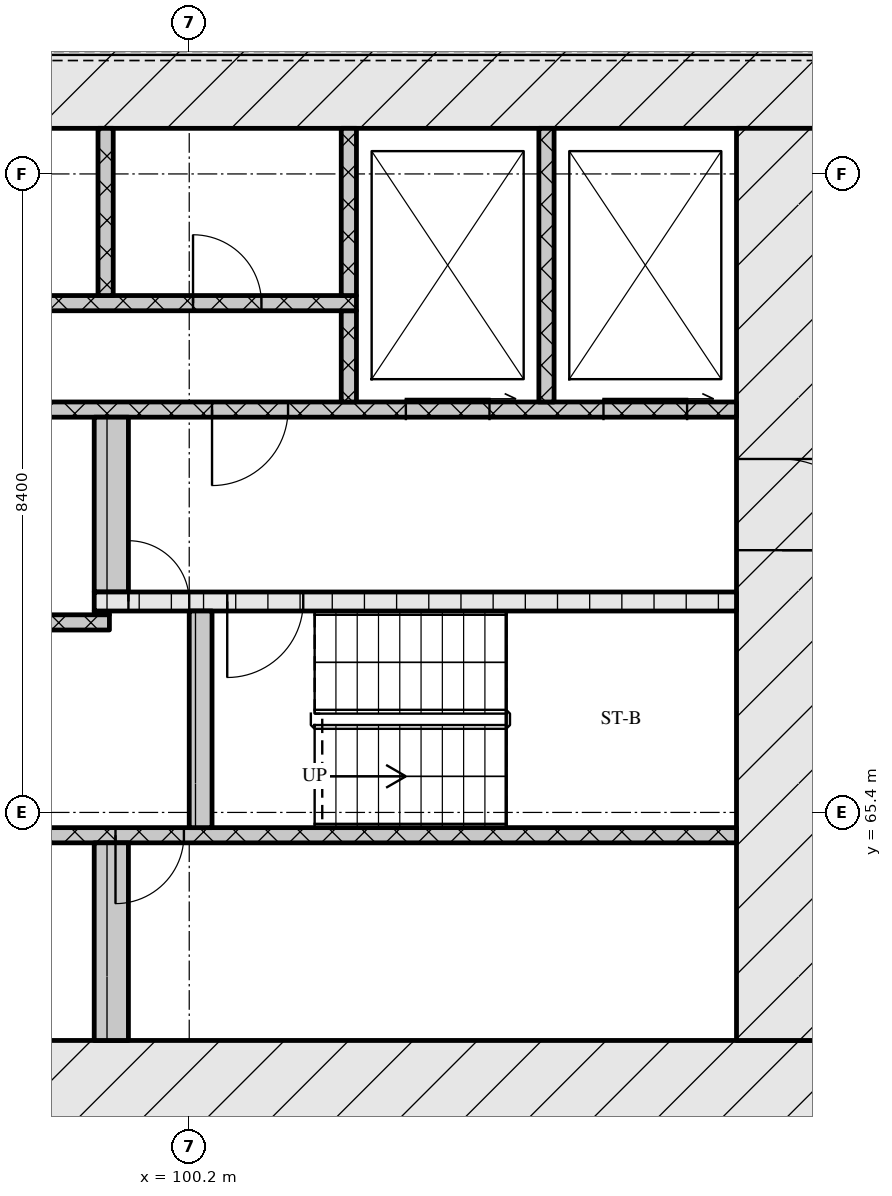
"""IFC4 building model, lengths in metres.
Left out: names, types, materials, properties, quantities, classifications, styles, units other than length and angle.
Written with IfcOpenShell. Run it as: python <this file> out.ifc"""

import sys

from ifc_helpers import new_model, si_unit, direction, frame, frame_2d, origin, place, context, subcontext, project, spatial, rectangle, extrude, element, fill, save


model = new_model("IFC4")
c1 = context("Model", 3, precision=1e-05, world=origin(), true_north=direction((0.0, 1.0)))
c2 = subcontext(c1, "Body", "Model", "MODEL_VIEW")
j1 = project(units=[si_unit("LENGTHUNIT", "METRE"), si_unit("PLANEANGLEUNIT", "RADIAN")], contexts=[c1])
p1 = place(None, origin())
s1 = spatial("IfcSite", under=j1, at=p1, CompositionType="ELEMENT")
p2 = place(p1, origin())
s2 = spatial("IfcBuilding", under=s1, at=p2, CompositionType="ELEMENT")
p3 = place(p2, frame((0.0, 0.0, 40.8)))
s3 = spatial("IfcBuildingStorey", under=s2, at=p3, CompositionType="ELEMENT", Elevation=40.8)
p4 = place(p3, frame((66.6, 61.8, 0.0), z_axis=(0.0, 0.0, 1.0), x_axis=(1.0, 0.0, 0.0)))
e1 = element("IfcWall", 1, at=p4, inside=s3, PredefinedType="SOLIDWALL", context=c2, shape_type="SweptSolid", body=[
    extrude(rectangle(XDim=42.0, YDim=1.2, at=frame_2d((21.0, 0.0))), origin(), (0.0, 0.0, 1.0), 3.32),
])
p5 = place(p4, frame((21.35, 0.0, 0.0)))
e2 = element("IfcOpeningElement", 2, at=p5, cuts=e1, PredefinedType="OPENING", context=c2, shape_type="SweptSolid", body=[
    extrude(rectangle(XDim=1.8, YDim=2.1, at=frame_2d((0.9, 1.05))), frame((0.0, 0.61, 0.0), z_axis=(0.0, -1.0, 0.0), x_axis=(1.0, 0.0, 0.0)), (0.0, 0.0, 1.0), 1.22),
])
p6 = place(p3, frame((66.6, 75.0, 0.0), z_axis=(0.0, 0.0, 1.0), x_axis=(1.0, 0.0, 0.0)))
e3 = element("IfcWall", 3, at=p6, inside=s3, PredefinedType="SOLIDWALL", context=c2, shape_type="SweptSolid", body=[
    extrude(rectangle(XDim=42.0, YDim=1.2, at=frame_2d((21.0, 0.0))), origin(), (0.0, 0.0, 1.0), 3.32),
])
p7 = place(p3, frame((108.0, 62.4, 0.0), z_axis=(0.0, 0.0, 1.0), x_axis=(0.0, 1.0, 0.0)))
e4 = element("IfcWall", 4, at=p7, inside=s3, PredefinedType="SOLIDWALL", context=c2, shape_type="SweptSolid", body=[
    extrude(rectangle(XDim=12.0, YDim=1.2, at=frame_2d((6.0, 0.0))), origin(), (0.0, 0.0, 1.0), 3.32),
])
p8 = place(p7, frame((6.45, 0.0, 0.0)))
e5 = element("IfcOpeningElement", 5, at=p8, cuts=e4, PredefinedType="OPENING", context=c2, shape_type="SweptSolid", body=[
    extrude(rectangle(XDim=1.2, YDim=2.1, at=frame_2d((0.6, 1.05))), frame((0.0, 0.61, 0.0), z_axis=(0.0, -1.0, 0.0), x_axis=(1.0, 0.0, 0.0)), (0.0, 0.0, 1.0), 1.22),
])
p9 = place(p3, frame((99.175, 62.4, 0.0), z_axis=(0.0, 0.0, 1.0), x_axis=(0.0, 1.0, 0.0)))
e6 = element("IfcWall", 6, at=p9, inside=s3, PredefinedType="SOLIDWALL", context=c2, shape_type="SweptSolid", body=[
    extrude(rectangle(XDim=2.6, YDim=0.45, at=frame_2d((1.3, 0.0))), origin(), (0.0, 0.0, 1.0), 3.32),
])
p10 = place(p3, frame((91.4, 65.1, 0.0), z_axis=(0.0, 0.0, 1.0), x_axis=(1.0, 0.0, 0.0)))
e7 = element("IfcWall", 7, at=p10, inside=s3, PredefinedType="SOLIDWALL", context=c2, shape_type="SweptSolid", body=[
    extrude(rectangle(XDim=16.0, YDim=0.2, at=frame_2d((8.0, 0.0))), origin(), (0.0, 0.0, 1.0), 3.32),
])
p11 = place(p10, frame((7.83, 0.0, 0.0)))
e8 = element("IfcOpeningElement", 8, at=p11, cuts=e7, PredefinedType="OPENING", context=c2, shape_type="SweptSolid", body=[
    extrude(rectangle(XDim=0.9, YDim=2.1, at=frame_2d((0.45, 1.05))), frame((0.0, 0.11, 0.0), z_axis=(0.0, -1.0, 0.0), x_axis=(1.0, 0.0, 0.0)), (0.0, 0.0, 1.0), 0.22),
])
p12 = place(p3, frame((100.35, 65.2, 0.0), z_axis=(0.0, 0.0, 1.0), x_axis=(0.0, 1.0, 0.0)))
e9 = element("IfcWall", 9, at=p12, inside=s3, PredefinedType="SOLIDWALL", context=c2, shape_type="SweptSolid", body=[
    extrude(rectangle(XDim=2.85, YDim=0.3, at=frame_2d((1.425, 0.0))), origin(), (0.0, 0.0, 1.0), 3.32),
])
p13 = place(p3, frame((76.05, 67.9, 0.0), z_axis=(0.0, 0.0, 1.0), x_axis=(1.0, 0.0, 0.0)))
e10 = element("IfcWall", 10, at=p13, inside=s3, PredefinedType="SOLIDWALL", context=c2, shape_type="SweptSolid", body=[
    extrude(rectangle(XDim=23.1, YDim=0.2, at=frame_2d((11.55, 0.0))), origin(), (0.0, 0.0, 1.0), 3.32),
])
p14 = place(p13, frame((0.6, 0.0, 0.0)))
e11 = element("IfcOpeningElement", 11, at=p14, cuts=e10, PredefinedType="OPENING", context=c2, shape_type="SweptSolid", body=[
    extrude(rectangle(XDim=1.1, YDim=2.1, at=frame_2d((0.55, 1.05))), frame((0.0, 0.11, 0.0), z_axis=(0.0, -1.0, 0.0), x_axis=(1.0, 0.0, 0.0)), (0.0, 0.0, 1.0), 0.22),
])
p15 = place(p13, frame((3.1, 0.0, 0.0)))
e12 = element("IfcOpeningElement", 12, at=p15, cuts=e10, PredefinedType="OPENING", context=c2, shape_type="SweptSolid", body=[
    extrude(rectangle(XDim=1.1, YDim=2.1, at=frame_2d((0.55, 1.05))), frame((0.0, 0.11, 0.0), z_axis=(0.0, -1.0, 0.0), x_axis=(1.0, 0.0, 0.0)), (0.0, 0.0, 1.0), 0.22),
])
p16 = place(p13, frame((5.6, 0.0, 0.0)))
e13 = element("IfcOpeningElement", 13, at=p16, cuts=e10, PredefinedType="OPENING", context=c2, shape_type="SweptSolid", body=[
    extrude(rectangle(XDim=1.1, YDim=2.1, at=frame_2d((0.55, 1.05))), frame((0.0, 0.11, 0.0), z_axis=(0.0, -1.0, 0.0), x_axis=(1.0, 0.0, 0.0)), (0.0, 0.0, 1.0), 0.22),
])
p17 = place(p13, frame((8.45, 0.0, 0.0)))
e14 = element("IfcOpeningElement", 14, at=p17, cuts=e10, PredefinedType="OPENING", context=c2, shape_type="SweptSolid", body=[
    extrude(rectangle(XDim=0.9, YDim=2.1, at=frame_2d((0.45, 1.05))), frame((0.0, 0.11, 0.0), z_axis=(0.0, -1.0, 0.0), x_axis=(1.0, 0.0, 0.0)), (0.0, 0.0, 1.0), 0.22),
])
p18 = place(p13, frame((10.91, 0.0, 0.0)))
e15 = element("IfcOpeningElement", 15, at=p18, cuts=e10, PredefinedType="OPENING", context=c2, shape_type="SweptSolid", body=[
    extrude(rectangle(XDim=0.9, YDim=2.1, at=frame_2d((0.45, 1.05))), frame((0.0, 0.11, 0.0), z_axis=(0.0, -1.0, 0.0), x_axis=(1.0, 0.0, 0.0)), (0.0, 0.0, 1.0), 0.22),
])
p19 = place(p13, frame((13.55, 0.0, 0.0)))
e16 = element("IfcOpeningElement", 16, at=p19, cuts=e10, PredefinedType="OPENING", context=c2, shape_type="SweptSolid", body=[
    extrude(rectangle(XDim=1.0, YDim=2.1, at=frame_2d((0.5, 1.05))), frame((0.0, 0.11, 0.0), z_axis=(0.0, -1.0, 0.0), x_axis=(1.0, 0.0, 0.0)), (0.0, 0.0, 1.0), 0.22),
])
p20 = place(p3, frame((98.95, 68.025, 0.0), z_axis=(0.0, 0.0, 1.0), x_axis=(1.0, 0.0, 0.0)))
e17 = element("IfcWall", 17, at=p20, inside=s3, PredefinedType="SOLIDWALL", context=c2, shape_type="SweptSolid", body=[
    extrude(rectangle(XDim=0.2, YDim=0.05, at=frame_2d((0.1, 0.0))), origin(), (0.0, 0.0, 1.0), 3.32),
])
p21 = place(p3, frame((98.95, 68.175, 0.0), z_axis=(0.0, 0.0, 1.0), x_axis=(1.0, 0.0, 0.0)))
e18 = element("IfcWall", 18, at=p21, inside=s3, PredefinedType="SOLIDWALL", context=c2, shape_type="SweptSolid", body=[
    extrude(rectangle(XDim=8.45, YDim=0.25, at=frame_2d((4.225, 0.0))), origin(), (0.0, 0.0, 1.0), 3.32),
])
p22 = place(p21, frame((0.45, 0.0, 0.0)))
e19 = element("IfcOpeningElement", 19, at=p22, cuts=e18, PredefinedType="OPENING", context=c2, shape_type="SweptSolid", body=[
    extrude(rectangle(XDim=0.8, YDim=2.1, at=frame_2d((0.4, 1.05))), frame((0.0, 0.135, 0.0), z_axis=(0.0, -1.0, 0.0), x_axis=(1.0, 0.0, 0.0)), (0.0, 0.0, 1.0), 0.27),
])
p23 = place(p21, frame((1.75, 0.0, 0.0)))
e20 = element("IfcOpeningElement", 20, at=p23, cuts=e18, PredefinedType="OPENING", context=c2, shape_type="SweptSolid", body=[
    extrude(rectangle(XDim=1.0, YDim=2.1, at=frame_2d((0.5, 1.05))), frame((0.0, 0.135, 0.0), z_axis=(0.0, -1.0, 0.0), x_axis=(1.0, 0.0, 0.0)), (0.0, 0.0, 1.0), 0.27),
])
p24 = place(p3, frame((99.175, 68.3, 0.0), z_axis=(0.0, 0.0, 1.0), x_axis=(0.0, 1.0, 0.0)))
e21 = element("IfcWall", 21, at=p24, inside=s3, PredefinedType="SOLIDWALL", context=c2, shape_type="SweptSolid", body=[
    extrude(rectangle(XDim=2.3, YDim=0.45, at=frame_2d((1.15, 0.0))), origin(), (0.0, 0.0, 1.0), 3.32),
])
p25 = place(p3, frame((67.8, 70.7, 0.0), z_axis=(0.0, 0.0, 1.0), x_axis=(1.0, 0.0, 0.0)))
e22 = element("IfcWall", 22, at=p25, inside=s3, PredefinedType="SOLIDWALL", context=c2, shape_type="SweptSolid", body=[
    extrude(rectangle(XDim=39.6, YDim=0.2, at=frame_2d((19.8, 0.0))), origin(), (0.0, 0.0, 1.0), 3.32),
])
p26 = place(p25, frame((0.65, 0.0, 0.0)))
e23 = element("IfcOpeningElement", 23, at=p26, cuts=e22, PredefinedType="OPENING", context=c2, shape_type="SweptSolid", body=[
    extrude(rectangle(XDim=1.1, YDim=2.1, at=frame_2d((0.55, 1.05))), frame((0.0, 0.11, 0.0), z_axis=(0.0, -1.0, 0.0), x_axis=(1.0, 0.0, 0.0)), (0.0, 0.0, 1.0), 0.22),
])
p27 = place(p25, frame((3.25, 0.0, 0.0)))
e24 = element("IfcOpeningElement", 24, at=p27, cuts=e22, PredefinedType="OPENING", context=c2, shape_type="SweptSolid", body=[
    extrude(rectangle(XDim=1.1, YDim=2.1, at=frame_2d((0.55, 1.05))), frame((0.0, 0.11, 0.0), z_axis=(0.0, -1.0, 0.0), x_axis=(1.0, 0.0, 0.0)), (0.0, 0.0, 1.0), 0.22),
])
p28 = place(p25, frame((5.9, 0.0, 0.0)))
e25 = element("IfcOpeningElement", 25, at=p28, cuts=e22, PredefinedType="OPENING", context=c2, shape_type="SweptSolid", body=[
    extrude(rectangle(XDim=1.0, YDim=2.1, at=frame_2d((0.5, 1.05))), frame((0.0, 0.11, 0.0), z_axis=(0.0, -1.0, 0.0), x_axis=(1.0, 0.0, 0.0)), (0.0, 0.0, 1.0), 0.22),
])
p29 = place(p25, frame((21.7, 0.0, 0.0)))
e26 = element("IfcOpeningElement", 26, at=p29, cuts=e22, PredefinedType="OPENING", context=c2, shape_type="SweptSolid", body=[
    extrude(rectangle(XDim=1.0, YDim=2.1, at=frame_2d((0.5, 1.05))), frame((0.0, 0.11, 0.0), z_axis=(0.0, -1.0, 0.0), x_axis=(1.0, 0.0, 0.0)), (0.0, 0.0, 1.0), 0.22),
])
p30 = place(p25, frame((32.7, 0.0, 0.0)))
e27 = element("IfcOpeningElement", 27, at=p30, cuts=e22, PredefinedType="OPENING", context=c2, shape_type="SweptSolid", body=[
    extrude(rectangle(XDim=1.0, YDim=2.1, at=frame_2d((0.5, 1.05))), frame((0.0, 0.11, 0.0), z_axis=(0.0, -1.0, 0.0), x_axis=(1.0, 0.0, 0.0)), (0.0, 0.0, 1.0), 0.22),
])
p31 = place(p25, frame((35.25, 0.0, 0.0)))
e28 = element("IfcOpeningElement", 28, at=p31, cuts=e22, PredefinedType="OPENING", context=c2, shape_type="SweptSolid", body=[
    extrude(rectangle(XDim=1.1, YDim=2.1, at=frame_2d((0.55, 1.05))), frame((0.0, 0.11, 0.0), z_axis=(0.0, -1.0, 0.0), x_axis=(1.0, 0.0, 0.0)), (0.0, 0.0, 1.0), 0.22),
])
p32 = place(p25, frame((37.85, 0.0, 0.0)))
e29 = element("IfcOpeningElement", 29, at=p32, cuts=e22, PredefinedType="OPENING", context=c2, shape_type="SweptSolid", body=[
    extrude(rectangle(XDim=1.1, YDim=2.1, at=frame_2d((0.55, 1.05))), frame((0.0, 0.11, 0.0), z_axis=(0.0, -1.0, 0.0), x_axis=(1.0, 0.0, 0.0)), (0.0, 0.0, 1.0), 0.22),
])
p33 = place(p3, frame((102.3, 70.8, 0.0), z_axis=(0.0, 0.0, 1.0), x_axis=(0.0, 1.0, 0.0)))
e30 = element("IfcWall", 30, at=p33, inside=s3, PredefinedType="SOLIDWALL", context=c2, shape_type="SweptSolid", body=[
    extrude(rectangle(XDim=1.2, YDim=0.2, at=frame_2d((0.6, 0.0))), origin(), (0.0, 0.0, 1.0), 3.32),
])
p34 = place(p3, frame((104.9, 70.8, 0.0), z_axis=(0.0, 0.0, 1.0), x_axis=(0.0, 1.0, 0.0)))
e31 = element("IfcWall", 31, at=p34, inside=s3, PredefinedType="SOLIDWALL", context=c2, shape_type="SweptSolid", body=[
    extrude(rectangle(XDim=3.6, YDim=0.2, at=frame_2d((1.8, 0.0))), origin(), (0.0, 0.0, 1.0), 3.32),
])
p35 = place(p3, frame((93.28, 72.1, 0.0), z_axis=(0.0, 0.0, 1.0), x_axis=(1.0, 0.0, 0.0)))
e32 = element("IfcWall", 32, at=p35, inside=s3, PredefinedType="SOLIDWALL", context=c2, shape_type="SweptSolid", body=[
    extrude(rectangle(XDim=9.12, YDim=0.2, at=frame_2d((4.56, 0.0))), origin(), (0.0, 0.0, 1.0), 3.32),
])
p36 = place(p35, frame((0.87, 0.0, 0.0)))
e33 = element("IfcOpeningElement", 33, at=p36, cuts=e32, PredefinedType="OPENING", context=c2, shape_type="SweptSolid", body=[
    extrude(rectangle(XDim=0.9, YDim=2.1, at=frame_2d((0.45, 1.05))), frame((0.0, 0.11, 0.0), z_axis=(0.0, -1.0, 0.0), x_axis=(1.0, 0.0, 0.0)), (0.0, 0.0, 1.0), 0.22),
])
p37 = place(p35, frame((3.73, 0.0, 0.0)))
e34 = element("IfcOpeningElement", 34, at=p37, cuts=e32, PredefinedType="OPENING", context=c2, shape_type="SweptSolid", body=[
    extrude(rectangle(XDim=0.9, YDim=2.1, at=frame_2d((0.45, 1.05))), frame((0.0, 0.11, 0.0), z_axis=(0.0, -1.0, 0.0), x_axis=(1.0, 0.0, 0.0)), (0.0, 0.0, 1.0), 0.22),
])
p38 = place(p35, frame((6.97, 0.0, 0.0)))
e35 = element("IfcOpeningElement", 35, at=p38, cuts=e32, PredefinedType="OPENING", context=c2, shape_type="SweptSolid", body=[
    extrude(rectangle(XDim=0.9, YDim=2.1, at=frame_2d((0.45, 1.05))), frame((0.0, 0.11, 0.0), z_axis=(0.0, -1.0, 0.0), x_axis=(1.0, 0.0, 0.0)), (0.0, 0.0, 1.0), 0.22),
])
for number, where, z_axis, x_axis in (
    (36, (99.1, 72.2, 0.0), (0.0, 0.0, 1.0), (0.0, 1.0, 0.0)),
    (37, (102.3, 72.2, 0.0), (0.0, 0.0, 1.0), (0.0, 1.0, 0.0)),
):
    element("IfcWall", number, at=place(p3, frame(where, z_axis=z_axis, x_axis=x_axis)), inside=s3, PredefinedType="SOLIDWALL", context=c2, shape_type="SweptSolid", body=[
        extrude(rectangle(XDim=2.2, YDim=0.2, at=frame_2d((1.1, 0.0))), origin(), (0.0, 0.0, 1.0), 3.32),
    ])
p39 = place(p11, origin())
e38 = element("IfcDoor", 38, at=p39, inside=s3, OperationType="SINGLE_SWING_RIGHT", PredefinedType="DOOR", context=c2, shape_type="SweptSolid", body=[
    extrude(rectangle(XDim=0.9, YDim=2.1, at=frame_2d((0.45, 1.05))), frame((0.0, 0.025, 0.0), z_axis=(0.0, -1.0, 0.0), x_axis=(1.0, 0.0, 0.0)), (0.0, 0.0, 1.0), 0.05),
])
fill(e8, e38)
p40 = place(p22, origin())
e39 = element("IfcDoor", 39, at=p40, inside=s3, OperationType="SINGLE_SWING_LEFT", PredefinedType="DOOR", context=c2, shape_type="SweptSolid", body=[
    extrude(rectangle(XDim=0.8, YDim=2.1, at=frame_2d((0.4, 1.05))), frame((0.0, 0.025, 0.0), z_axis=(0.0, -1.0, 0.0), x_axis=(1.0, 0.0, 0.0)), (0.0, 0.0, 1.0), 0.05),
])
fill(e19, e39)
p41 = place(p23, origin())
e40 = element("IfcDoor", 40, at=p41, inside=s3, OperationType="SINGLE_SWING_RIGHT", PredefinedType="DOOR", context=c2, shape_type="SweptSolid", body=[
    extrude(rectangle(XDim=1.0, YDim=2.1, at=frame_2d((0.5, 1.05))), frame((0.0, 0.025, 0.0), z_axis=(0.0, -1.0, 0.0), x_axis=(1.0, 0.0, 0.0)), (0.0, 0.0, 1.0), 0.05),
])
fill(e20, e40)
p42 = place(p8, origin())
e41 = element("IfcDoor", 41, at=p42, inside=s3, OperationType="SINGLE_SWING_RIGHT", PredefinedType="DOOR", context=c2, shape_type="SweptSolid", body=[
    extrude(rectangle(XDim=1.2, YDim=2.1, at=frame_2d((0.6, 1.05))), frame((0.0, 0.025, 0.0), z_axis=(0.0, -1.0, 0.0), x_axis=(1.0, 0.0, 0.0)), (0.0, 0.0, 1.0), 0.05),
])
fill(e5, e41)
p43 = place(p30, origin())
e42 = element("IfcDoor", 42, at=p43, inside=s3, OperationType="SINGLE_SWING_RIGHT", PredefinedType="DOOR", context=c2, shape_type="SweptSolid", body=[
    extrude(rectangle(XDim=1.0, YDim=2.1, at=frame_2d((0.5, 1.05))), frame((0.0, 0.025, 0.0), z_axis=(0.0, -1.0, 0.0), x_axis=(1.0, 0.0, 0.0)), (0.0, 0.0, 1.0), 0.05),
])
fill(e27, e42)
p44 = place(p31, origin())
e43 = element("IfcDoor", 43, at=p44, inside=s3, OperationType="SLIDING_TO_RIGHT", PredefinedType="DOOR", context=c2, shape_type="SweptSolid", body=[
    extrude(rectangle(XDim=1.1, YDim=2.1, at=frame_2d((0.55, 1.05))), frame((0.0, 0.025, 0.0), z_axis=(0.0, -1.0, 0.0), x_axis=(1.0, 0.0, 0.0)), (0.0, 0.0, 1.0), 0.05),
])
fill(e28, e43)
p45 = place(p32, origin())
e44 = element("IfcDoor", 44, at=p45, inside=s3, OperationType="SLIDING_TO_RIGHT", PredefinedType="DOOR", context=c2, shape_type="SweptSolid", body=[
    extrude(rectangle(XDim=1.1, YDim=2.1, at=frame_2d((0.55, 1.05))), frame((0.0, 0.025, 0.0), z_axis=(0.0, -1.0, 0.0), x_axis=(1.0, 0.0, 0.0)), (0.0, 0.0, 1.0), 0.05),
])
fill(e29, e44)
p46 = place(p38, origin())
e45 = element("IfcDoor", 45, at=p46, inside=s3, OperationType="SINGLE_SWING_LEFT", PredefinedType="DOOR", context=c2, shape_type="SweptSolid", body=[
    extrude(rectangle(XDim=0.9, YDim=2.1, at=frame_2d((0.45, 1.05))), frame((0.0, 0.025, 0.0), z_axis=(0.0, -1.0, 0.0), x_axis=(1.0, 0.0, 0.0)), (0.0, 0.0, 1.0), 0.05),
])
fill(e35, e45)
save(model, sys.argv[1])
